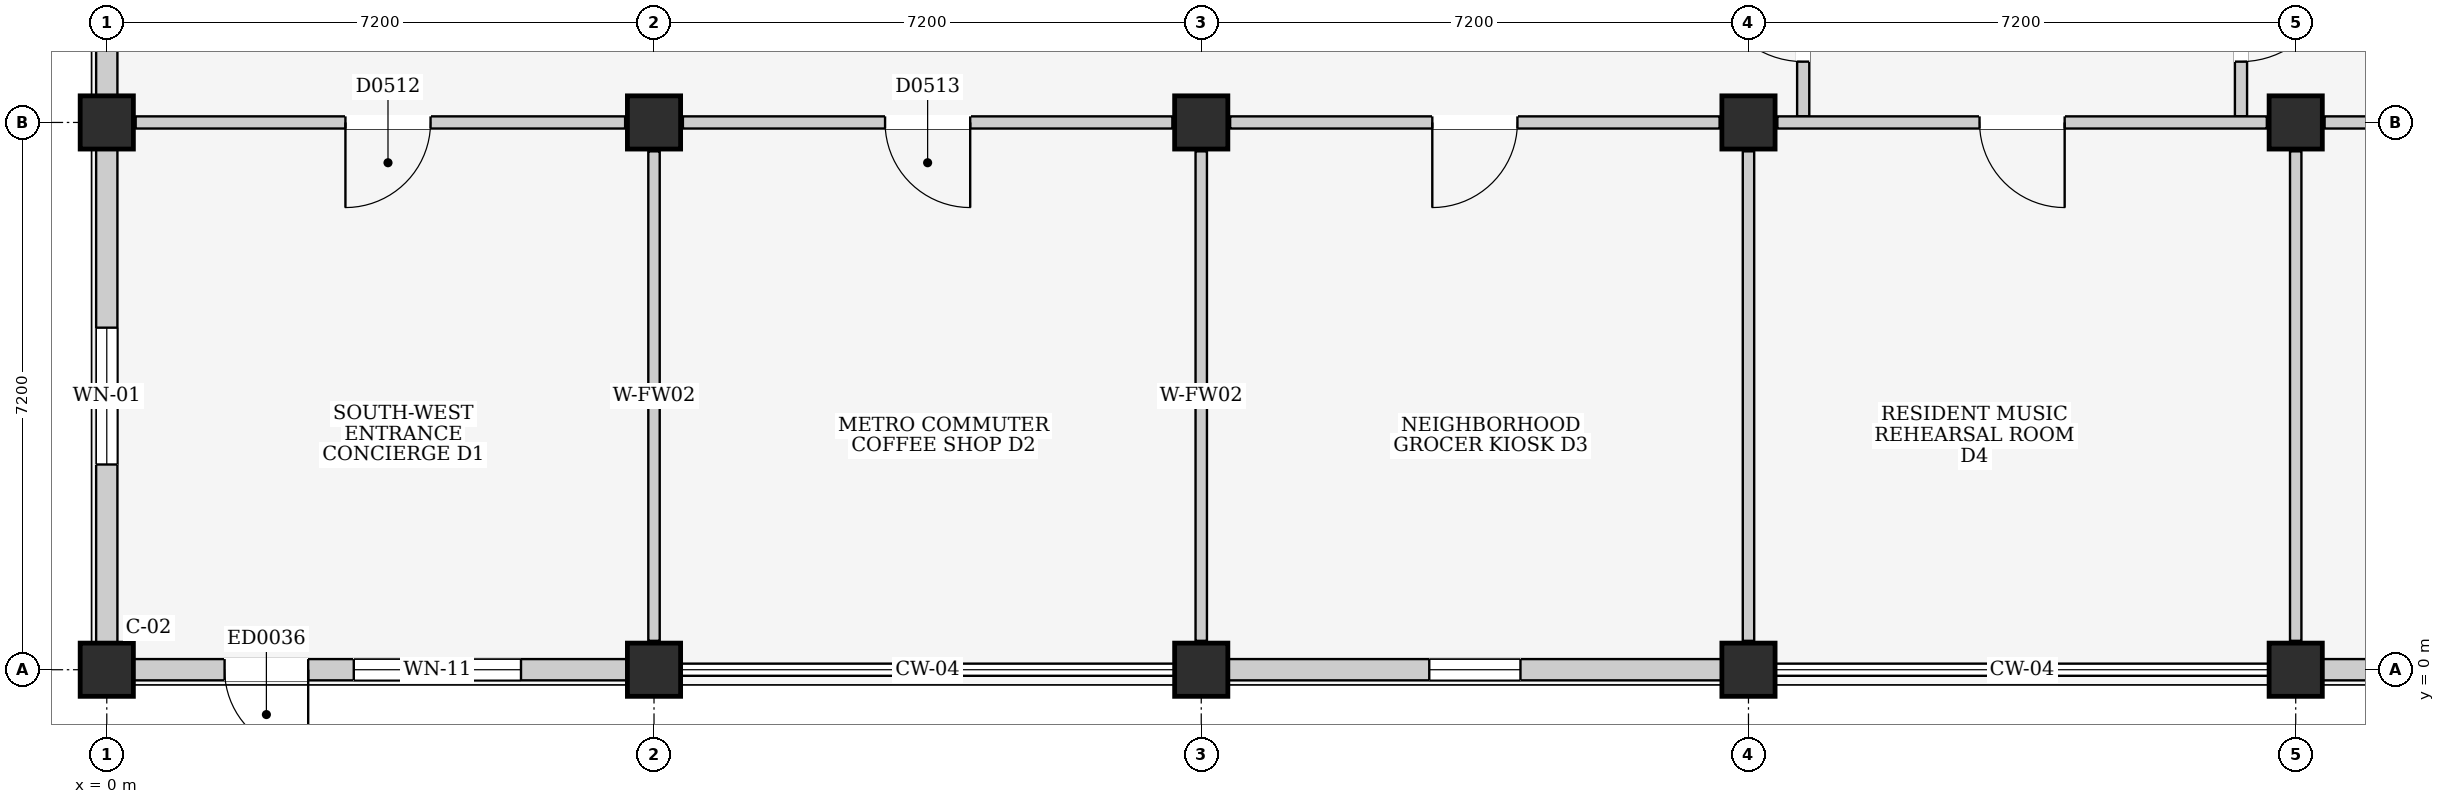
"""IFC4 building model, lengths in metres.
Left out: names, types, materials, properties, quantities, classifications, styles, units other than length and angle.
Written with IfcOpenShell. Run it as: python <this file> out.ifc"""

import sys

from ifc_helpers import new_model, si_unit, direction, frame, frame_2d, origin, origin_2d, place, context, subcontext, project, spatial, rectangle, extrude, element, fill, save


model = new_model("IFC4")
c1 = context("Model", 3, precision=1e-05, world=origin(), true_north=direction((0.0, 1.0)))
c2 = subcontext(c1, "Body", "Model", "MODEL_VIEW")
j1 = project(units=[si_unit("LENGTHUNIT", "METRE"), si_unit("PLANEANGLEUNIT", "RADIAN")], contexts=[c1])
p1 = place(None, origin())
s1 = spatial("IfcSite", under=j1, at=p1, CompositionType="ELEMENT")
p2 = place(p1, origin())
s2 = spatial("IfcBuilding", under=s1, at=p2, CompositionType="ELEMENT")
p3 = place(p2, origin())
s3 = spatial("IfcBuildingStorey", under=s2, at=p3, CompositionType="ELEMENT", Elevation=0.0)
for number, where, z_axis, x_axis in (
    (1, (0.0, 0.0, 0.0), (0.0, 0.0, 1.0), (1.0, 0.0, 0.0)),
    (2, (0.0, 7.2, 0.0), (0.0, 0.0, 1.0), (1.0, 0.0, 0.0)),
    (3, (7.2, 0.0, 0.0), (0.0, 0.0, 1.0), (1.0, 0.0, 0.0)),
    (4, (7.2, 7.2, 0.0), (0.0, 0.0, 1.0), (1.0, 0.0, 0.0)),
    (5, (14.4, 0.0, 0.0), (0.0, 0.0, 1.0), (1.0, 0.0, 0.0)),
    (6, (14.4, 7.2, 0.0), (0.0, 0.0, 1.0), (1.0, 0.0, 0.0)),
    (7, (21.6, 0.0, 0.0), (0.0, 0.0, 1.0), (1.0, 0.0, 0.0)),
    (8, (21.6, 7.2, 0.0), (0.0, 0.0, 1.0), (1.0, 0.0, 0.0)),
    (9, (28.8, 0.0, 0.0), (0.0, 0.0, 1.0), (1.0, 0.0, 0.0)),
    (10, (28.8, 7.2, 0.0), (0.0, 0.0, 1.0), (1.0, 0.0, 0.0)),
):
    element("IfcColumn", number, at=place(p3, frame(where, z_axis=z_axis, x_axis=x_axis)), inside=s3, PredefinedType="COLUMN", context=c2, shape_type="SweptSolid", body=[
        extrude(rectangle(XDim=0.7, YDim=0.7, at=origin_2d()), origin(), (0.0, 0.0, 1.0), 4.5),
    ])
p4 = place(p3, frame((0.35, 0.0, 0.0), z_axis=(0.0, 0.0, 1.0), x_axis=(1.0, 0.0, 0.0)))
e11 = element("IfcWall", 11, at=p4, inside=s3, PredefinedType="ELEMENTEDWALL", context=c2, shape_type="SweptSolid", body=[
    extrude(rectangle(XDim=6.5, YDim=0.28, at=frame_2d((3.25, 0.0))), origin(), (0.0, 0.0, 1.0), 3.665),
])
p5 = place(p4, frame((1.2, 0.0, 0.0)))
e12 = element("IfcOpeningElement", 12, at=p5, cuts=e11, PredefinedType="OPENING", context=c2, shape_type="SweptSolid", body=[
    extrude(rectangle(XDim=1.1, YDim=2.2, at=frame_2d((0.55, 1.1))), frame((0.0, 0.155, 0.0), z_axis=(0.0, -1.0, 0.0), x_axis=(1.0, 0.0, 0.0)), (0.0, 0.0, 1.0), 0.31),
])
p6 = place(p4, frame((2.9, 0.0, 0.85)))
e13 = element("IfcOpeningElement", 13, at=p6, cuts=e11, PredefinedType="OPENING", context=c2, shape_type="SweptSolid", body=[
    extrude(rectangle(XDim=2.2, YDim=1.8, at=frame_2d((1.1, 0.9))), frame((0.0, 0.155, 0.0), z_axis=(0.0, -1.0, 0.0), x_axis=(1.0, 0.0, 0.0)), (0.0, 0.0, 1.0), 0.31),
])
p7 = place(p3, frame((0.0, 0.35, 0.0), z_axis=(0.0, 0.0, 1.0), x_axis=(0.0, 1.0, 0.0)))
e14 = element("IfcWall", 14, at=p7, inside=s3, PredefinedType="ELEMENTEDWALL", context=c2, shape_type="SweptSolid", body=[
    extrude(rectangle(XDim=6.5, YDim=0.28, at=frame_2d((3.25, 0.0))), origin(), (0.0, 0.0, 1.0), 3.665),
])
p8 = place(p7, frame((2.35, 0.0, 0.95)))
e15 = element("IfcOpeningElement", 15, at=p8, cuts=e14, PredefinedType="OPENING", context=c2, shape_type="SweptSolid", body=[
    extrude(rectangle(XDim=1.8, YDim=1.5, at=frame_2d((0.9, 0.75))), frame((0.0, 0.155, 0.0), z_axis=(0.0, -1.0, 0.0), x_axis=(1.0, 0.0, 0.0)), (0.0, 0.0, 1.0), 0.31),
])
p9 = place(p3, frame((0.0, 7.55, 0.0), z_axis=(0.0, 0.0, 1.0), x_axis=(0.0, 1.0, 0.0)))
e16 = element("IfcWall", 16, at=p9, inside=s3, PredefinedType="ELEMENTEDWALL", context=c2, shape_type="SweptSolid", body=[
    extrude(rectangle(XDim=6.5, YDim=0.28, at=frame_2d((3.25, 0.0))), origin(), (0.0, 0.0, 1.0), 3.665),
])
p10 = place(p9, frame((2.5, 0.0, 0.95)))
e17 = element("IfcOpeningElement", 17, at=p10, cuts=e16, PredefinedType="OPENING", context=c2, shape_type="SweptSolid", body=[
    extrude(rectangle(XDim=1.5, YDim=1.5, at=frame_2d((0.75, 0.75))), frame((0.0, 0.155, 0.0), z_axis=(0.0, -1.0, 0.0), x_axis=(1.0, 0.0, 0.0)), (0.0, 0.0, 1.0), 0.31),
])
p11 = place(p3, frame((14.75, 0.0, 0.0), z_axis=(0.0, 0.0, 1.0), x_axis=(1.0, 0.0, 0.0)))
e18 = element("IfcWall", 18, at=p11, inside=s3, PredefinedType="ELEMENTEDWALL", context=c2, shape_type="SweptSolid", body=[
    extrude(rectangle(XDim=6.5, YDim=0.28, at=frame_2d((3.25, 0.0))), origin(), (0.0, 0.0, 1.0), 3.665),
])
p12 = place(p11, frame((2.65, 0.0, 0.95)))
e19 = element("IfcOpeningElement", 19, at=p12, cuts=e18, PredefinedType="OPENING", context=c2, shape_type="SweptSolid", body=[
    extrude(rectangle(XDim=1.2, YDim=1.35, at=frame_2d((0.6, 0.675))), frame((0.0, 0.155, 0.0), z_axis=(0.0, -1.0, 0.0), x_axis=(1.0, 0.0, 0.0)), (0.0, 0.0, 1.0), 0.31),
])
p13 = place(p3, frame((29.15, 0.0, 0.0), z_axis=(0.0, 0.0, 1.0), x_axis=(1.0, 0.0, 0.0)))
e20 = element("IfcWall", 20, at=p13, inside=s3, PredefinedType="ELEMENTEDWALL", context=c2, shape_type="SweptSolid", body=[
    extrude(rectangle(XDim=6.5, YDim=0.28, at=frame_2d((3.25, 0.0))), origin(), (0.0, 0.0, 1.0), 3.665),
])
p14 = place(p13, frame((2.05, 0.0, 0.95)))
e21 = element("IfcOpeningElement", 21, at=p14, cuts=e20, PredefinedType="OPENING", context=c2, shape_type="SweptSolid", body=[
    extrude(rectangle(XDim=2.4, YDim=1.65, at=frame_2d((1.2, 0.825))), frame((0.0, 0.155, 0.0), z_axis=(0.0, -1.0, 0.0), x_axis=(1.0, 0.0, 0.0)), (0.0, 0.0, 1.0), 0.31),
])
p15 = place(p3, frame((22.32, 7.28, 0.0), z_axis=(0.0, 0.0, 1.0), x_axis=(0.0, 1.0, 0.0)))
e22 = element("IfcWall", 22, at=p15, inside=s3, PredefinedType="PARTITIONING", context=c2, shape_type="SweptSolid", body=[
    extrude(rectangle(XDim=4.32, YDim=0.16, at=frame_2d((2.16, 0.0))), origin(), (0.0, 0.0, 1.0), 4.2),
])
p16 = place(p15, frame((0.72, 0.0, 0.0)))
e23 = element("IfcOpeningElement", 23, at=p16, cuts=e22, PredefinedType="OPENING", context=c2, shape_type="SweptSolid", body=[
    extrude(rectangle(XDim=1.2, YDim=2.2, at=frame_2d((0.6, 1.1))), frame((0.0, 0.095, 0.0), z_axis=(0.0, -1.0, 0.0), x_axis=(1.0, 0.0, 0.0)), (0.0, 0.0, 1.0), 0.19),
])
p17 = place(p3, frame((28.08, 7.28, 0.0), z_axis=(0.0, 0.0, 1.0), x_axis=(0.0, 1.0, 0.0)))
e24 = element("IfcWall", 24, at=p17, inside=s3, PredefinedType="PARTITIONING", context=c2, shape_type="SweptSolid", body=[
    extrude(rectangle(XDim=4.32, YDim=0.16, at=frame_2d((2.16, 0.0))), origin(), (0.0, 0.0, 1.0), 4.2),
])
p18 = place(p17, frame((0.72, 0.0, 0.0)))
e25 = element("IfcOpeningElement", 25, at=p18, cuts=e24, PredefinedType="OPENING", context=c2, shape_type="SweptSolid", body=[
    extrude(rectangle(XDim=1.2, YDim=2.2, at=frame_2d((0.6, 1.1))), frame((0.0, 0.095, 0.0), z_axis=(0.0, -1.0, 0.0), x_axis=(1.0, 0.0, 0.0)), (0.0, 0.0, 1.0), 0.19),
])
p19 = place(p3, frame((0.38, 7.2, 0.0), z_axis=(0.0, 0.0, 1.0), x_axis=(1.0, 0.0, 0.0)))
e26 = element("IfcWall", 26, at=p19, inside=s3, PredefinedType="PARTITIONING", context=c2, shape_type="SweptSolid", body=[
    extrude(rectangle(XDim=6.44, YDim=0.16, at=frame_2d((3.22, 0.0))), origin(), (0.0, 0.0, 1.0), 3.435),
])
p20 = place(p19, frame((2.76, 0.0, 0.0)))
e27 = element("IfcOpeningElement", 27, at=p20, cuts=e26, PredefinedType="OPENING", context=c2, shape_type="SweptSolid", body=[
    extrude(rectangle(XDim=1.12, YDim=2.2, at=frame_2d((0.56, 1.1))), frame((0.0, 0.095, 0.0), z_axis=(0.0, -1.0, 0.0), x_axis=(1.0, 0.0, 0.0)), (0.0, 0.0, 1.0), 0.19),
])
p21 = place(p3, frame((7.2, 0.38, 0.0), z_axis=(0.0, 0.0, 1.0), x_axis=(0.0, 1.0, 0.0)))
e28 = element("IfcWall", 28, at=p21, inside=s3, PredefinedType="PARTITIONING", context=c2, shape_type="SweptSolid", body=[
    extrude(rectangle(XDim=6.44, YDim=0.15, at=frame_2d((3.22, 0.0))), origin(), (0.0, 0.0, 1.0), 3.435),
])
p22 = place(p3, frame((7.58, 7.2, 0.0), z_axis=(0.0, 0.0, 1.0), x_axis=(1.0, 0.0, 0.0)))
e29 = element("IfcWall", 29, at=p22, inside=s3, PredefinedType="PARTITIONING", context=c2, shape_type="SweptSolid", body=[
    extrude(rectangle(XDim=6.44, YDim=0.16, at=frame_2d((3.22, 0.0))), origin(), (0.0, 0.0, 1.0), 3.435),
])
p23 = place(p22, frame((2.66, 0.0, 0.0)))
e30 = element("IfcOpeningElement", 30, at=p23, cuts=e29, PredefinedType="OPENING", context=c2, shape_type="SweptSolid", body=[
    extrude(rectangle(XDim=1.12, YDim=2.2, at=frame_2d((0.56, 1.1))), frame((0.0, 0.095, 0.0), z_axis=(0.0, -1.0, 0.0), x_axis=(1.0, 0.0, 0.0)), (0.0, 0.0, 1.0), 0.19),
])
p24 = place(p3, frame((14.4, 0.38, 0.0), z_axis=(0.0, 0.0, 1.0), x_axis=(0.0, 1.0, 0.0)))
e31 = element("IfcWall", 31, at=p24, inside=s3, PredefinedType="PARTITIONING", context=c2, shape_type="SweptSolid", body=[
    extrude(rectangle(XDim=6.44, YDim=0.15, at=frame_2d((3.22, 0.0))), origin(), (0.0, 0.0, 1.0), 3.435),
])
p25 = place(p3, frame((14.78, 7.2, 0.0), z_axis=(0.0, 0.0, 1.0), x_axis=(1.0, 0.0, 0.0)))
e32 = element("IfcWall", 32, at=p25, inside=s3, PredefinedType="PARTITIONING", context=c2, shape_type="SweptSolid", body=[
    extrude(rectangle(XDim=6.44, YDim=0.16, at=frame_2d((3.22, 0.0))), origin(), (0.0, 0.0, 1.0), 3.435),
])
p26 = place(p25, frame((2.66, 0.0, 0.0)))
e33 = element("IfcOpeningElement", 33, at=p26, cuts=e32, PredefinedType="OPENING", context=c2, shape_type="SweptSolid", body=[
    extrude(rectangle(XDim=1.12, YDim=2.2, at=frame_2d((0.56, 1.1))), frame((0.0, 0.095, 0.0), z_axis=(0.0, -1.0, 0.0), x_axis=(1.0, 0.0, 0.0)), (0.0, 0.0, 1.0), 0.19),
])
p27 = place(p3, frame((21.6, 0.38, 0.0), z_axis=(0.0, 0.0, 1.0), x_axis=(0.0, 1.0, 0.0)))
e34 = element("IfcWall", 34, at=p27, inside=s3, PredefinedType="PARTITIONING", context=c2, shape_type="SweptSolid", body=[
    extrude(rectangle(XDim=6.44, YDim=0.15, at=frame_2d((3.22, 0.0))), origin(), (0.0, 0.0, 1.0), 3.435),
])
p28 = place(p3, frame((21.98, 7.2, 0.0), z_axis=(0.0, 0.0, 1.0), x_axis=(1.0, 0.0, 0.0)))
e35 = element("IfcWall", 35, at=p28, inside=s3, PredefinedType="PARTITIONING", context=c2, shape_type="SweptSolid", body=[
    extrude(rectangle(XDim=6.44, YDim=0.16, at=frame_2d((3.22, 0.0))), origin(), (0.0, 0.0, 1.0), 3.435),
])
p29 = place(p28, frame((2.66, 0.0, 0.0)))
e36 = element("IfcOpeningElement", 36, at=p29, cuts=e35, PredefinedType="OPENING", context=c2, shape_type="SweptSolid", body=[
    extrude(rectangle(XDim=1.12, YDim=2.2, at=frame_2d((0.56, 1.1))), frame((0.0, 0.095, 0.0), z_axis=(0.0, -1.0, 0.0), x_axis=(1.0, 0.0, 0.0)), (0.0, 0.0, 1.0), 0.19),
])
p30 = place(p3, frame((28.8, 0.38, 0.0), z_axis=(0.0, 0.0, 1.0), x_axis=(0.0, 1.0, 0.0)))
e37 = element("IfcWall", 37, at=p30, inside=s3, PredefinedType="PARTITIONING", context=c2, shape_type="SweptSolid", body=[
    extrude(rectangle(XDim=6.44, YDim=0.15, at=frame_2d((3.22, 0.0))), origin(), (0.0, 0.0, 1.0), 3.435),
])
p31 = place(p3, frame((29.18, 7.2, 0.0), z_axis=(0.0, 0.0, 1.0), x_axis=(1.0, 0.0, 0.0)))
e38 = element("IfcWall", 38, at=p31, inside=s3, PredefinedType="PARTITIONING", context=c2, shape_type="SweptSolid", body=[
    extrude(rectangle(XDim=6.44, YDim=0.16, at=frame_2d((3.22, 0.0))), origin(), (0.0, 0.0, 1.0), 3.435),
])
p32 = place(p31, frame((2.695, 0.0, 0.0)))
e39 = element("IfcOpeningElement", 39, at=p32, cuts=e38, PredefinedType="OPENING", context=c2, shape_type="SweptSolid", body=[
    extrude(rectangle(XDim=1.05, YDim=2.15, at=frame_2d((0.525, 1.075))), frame((0.0, 0.095, 0.0), z_axis=(0.0, -1.0, 0.0), x_axis=(1.0, 0.0, 0.0)), (0.0, 0.0, 1.0), 0.19),
])
p33 = place(p5, frame((1.1, 0.0, 0.0), z_axis=(0.0, 0.0, 1.0), x_axis=(-1.0, 0.0, 0.0)))
e40 = element("IfcDoor", 40, at=p33, inside=s3, OperationType="SINGLE_SWING_LEFT", PredefinedType="DOOR", context=c2, shape_type="SweptSolid", body=[
    extrude(rectangle(XDim=1.1, YDim=2.2, at=frame_2d((0.55, 1.1))), frame((0.0, 0.025, 0.0), z_axis=(0.0, -1.0, 0.0), x_axis=(1.0, 0.0, 0.0)), (0.0, 0.0, 1.0), 0.05),
])
fill(e12, e40)
p34 = place(p6, origin())
e41 = element("IfcWindow", 41, at=p34, inside=s3, PartitioningType="TRIPLE_PANEL_VERTICAL", PredefinedType="WINDOW", context=c2, shape_type="SweptSolid", body=[
    extrude(rectangle(XDim=2.2, YDim=1.8, at=frame_2d((1.1, 0.9))), frame((0.0, 0.03, 0.0), z_axis=(0.0, -1.0, 0.0), x_axis=(1.0, 0.0, 0.0)), (0.0, 0.0, 1.0), 0.06),
])
fill(e13, e41)
p35 = place(p8, origin())
e42 = element("IfcWindow", 42, at=p35, inside=s3, PartitioningType="DOUBLE_PANEL_VERTICAL", PredefinedType="WINDOW", context=c2, shape_type="SweptSolid", body=[
    extrude(rectangle(XDim=1.8, YDim=1.5, at=frame_2d((0.9, 0.75))), frame((0.0, 0.03, 0.0), z_axis=(0.0, -1.0, 0.0), x_axis=(1.0, 0.0, 0.0)), (0.0, 0.0, 1.0), 0.06),
])
fill(e15, e42)
p36 = place(p12, origin())
e43 = element("IfcWindow", 43, at=p36, inside=s3, PartitioningType="SINGLE_PANEL", PredefinedType="WINDOW", context=c2, shape_type="SweptSolid", body=[
    extrude(rectangle(XDim=1.2, YDim=1.35, at=frame_2d((0.6, 0.675))), frame((0.0, 0.03, 0.0), z_axis=(0.0, -1.0, 0.0), x_axis=(1.0, 0.0, 0.0)), (0.0, 0.0, 1.0), 0.06),
])
fill(e19, e43)
p37 = place(p16, origin())
e44 = element("IfcDoor", 44, at=p37, inside=s3, OperationType="SINGLE_SWING_RIGHT", PredefinedType="DOOR", context=c2, shape_type="SweptSolid", body=[
    extrude(rectangle(XDim=1.2, YDim=2.2, at=frame_2d((0.6, 1.1))), frame((0.0, 0.025, 0.0), z_axis=(0.0, -1.0, 0.0), x_axis=(1.0, 0.0, 0.0)), (0.0, 0.0, 1.0), 0.05),
])
fill(e23, e44)
p38 = place(p18, frame((1.2, 0.0, 0.0), z_axis=(0.0, 0.0, 1.0), x_axis=(-1.0, 0.0, 0.0)))
e45 = element("IfcDoor", 45, at=p38, inside=s3, OperationType="SINGLE_SWING_LEFT", PredefinedType="DOOR", context=c2, shape_type="SweptSolid", body=[
    extrude(rectangle(XDim=1.2, YDim=2.2, at=frame_2d((0.6, 1.1))), frame((0.0, 0.025, 0.0), z_axis=(0.0, -1.0, 0.0), x_axis=(1.0, 0.0, 0.0)), (0.0, 0.0, 1.0), 0.05),
])
fill(e25, e45)
p39 = place(p20, frame((1.12, 0.0, 0.0), z_axis=(0.0, 0.0, 1.0), x_axis=(-1.0, 0.0, 0.0)))
e46 = element("IfcDoor", 46, at=p39, inside=s3, OperationType="SINGLE_SWING_RIGHT", PredefinedType="DOOR", context=c2, shape_type="SweptSolid", body=[
    extrude(rectangle(XDim=1.12, YDim=2.2, at=frame_2d((0.56, 1.1))), frame((0.0, 0.025, 0.0), z_axis=(0.0, -1.0, 0.0), x_axis=(1.0, 0.0, 0.0)), (0.0, 0.0, 1.0), 0.05),
])
fill(e27, e46)
p40 = place(p23, frame((1.12, 0.0, 0.0), z_axis=(0.0, 0.0, 1.0), x_axis=(-1.0, 0.0, 0.0)))
e47 = element("IfcDoor", 47, at=p40, inside=s3, OperationType="SINGLE_SWING_LEFT", PredefinedType="DOOR", context=c2, shape_type="SweptSolid", body=[
    extrude(rectangle(XDim=1.12, YDim=2.2, at=frame_2d((0.56, 1.1))), frame((0.0, 0.025, 0.0), z_axis=(0.0, -1.0, 0.0), x_axis=(1.0, 0.0, 0.0)), (0.0, 0.0, 1.0), 0.05),
])
fill(e30, e47)
p41 = place(p26, frame((1.12, 0.0, 0.0), z_axis=(0.0, 0.0, 1.0), x_axis=(-1.0, 0.0, 0.0)))
e48 = element("IfcDoor", 48, at=p41, inside=s3, OperationType="SINGLE_SWING_RIGHT", PredefinedType="DOOR", context=c2, shape_type="SweptSolid", body=[
    extrude(rectangle(XDim=1.12, YDim=2.2, at=frame_2d((0.56, 1.1))), frame((0.0, 0.025, 0.0), z_axis=(0.0, -1.0, 0.0), x_axis=(1.0, 0.0, 0.0)), (0.0, 0.0, 1.0), 0.05),
])
fill(e33, e48)
p42 = place(p29, frame((1.12, 0.0, 0.0), z_axis=(0.0, 0.0, 1.0), x_axis=(-1.0, 0.0, 0.0)))
e49 = element("IfcDoor", 49, at=p42, inside=s3, OperationType="SINGLE_SWING_LEFT", PredefinedType="DOOR", context=c2, shape_type="SweptSolid", body=[
    extrude(rectangle(XDim=1.12, YDim=2.2, at=frame_2d((0.56, 1.1))), frame((0.0, 0.025, 0.0), z_axis=(0.0, -1.0, 0.0), x_axis=(1.0, 0.0, 0.0)), (0.0, 0.0, 1.0), 0.05),
])
fill(e36, e49)
save(model, sys.argv[1])
